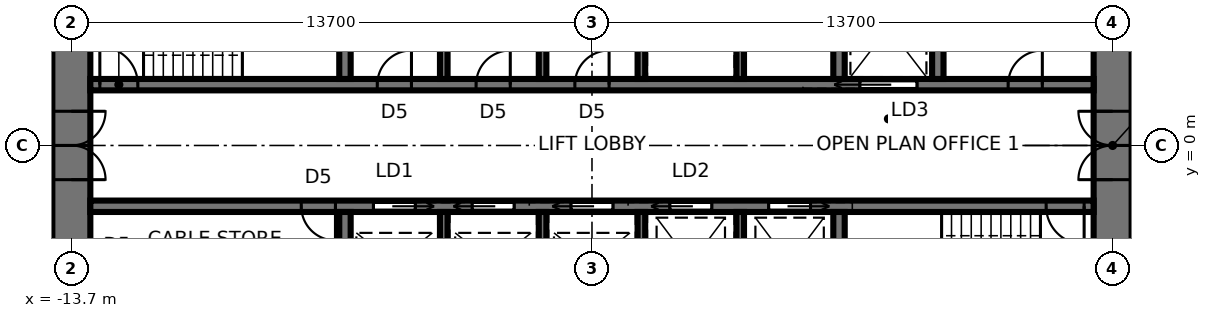
"""IFC4 building model, lengths in metres.
Left out: names, types, materials, properties, quantities, classifications, styles, units other than length and angle.
Written with IfcOpenShell. Run it as: python <this file> out.ifc"""

import sys

from ifc_helpers import new_model, si_unit, direction, frame, frame_2d, origin, place, context, subcontext, project, spatial, rectangle, extrude, element, fill, save


model = new_model("IFC4")
c1 = context("Model", 3, precision=1e-05, world=origin(), true_north=direction((0.0, 1.0)))
c2 = subcontext(c1, "Body", "Model", "MODEL_VIEW")
j1 = project(units=[si_unit("LENGTHUNIT", "METRE"), si_unit("PLANEANGLEUNIT", "RADIAN")], contexts=[c1])
p1 = place(None, origin())
s1 = spatial("IfcSite", under=j1, at=p1, CompositionType="ELEMENT")
p2 = place(p1, origin())
s2 = spatial("IfcBuilding", under=s1, at=p2, CompositionType="ELEMENT")
p3 = place(p2, frame((0.0, 0.0, 127.5)))
s3 = spatial("IfcBuildingStorey", under=s2, at=p3, CompositionType="ELEMENT", Elevation=127.5)
p4 = place(p3, frame((13.7, -9.5, 0.0), z_axis=(0.0, 0.0, 1.0), x_axis=(0.0, 1.0, 0.0)))
e1 = element("IfcWall", 1, at=p4, inside=s3, PredefinedType="SHEAR", context=c2, shape_type="SweptSolid", body=[
    extrude(rectangle(XDim=19.0, YDim=1.0, at=frame_2d((9.5, 0.0))), origin(), (0.0, 0.0, 1.0), 3.9),
])
p5 = place(p4, frame((8.6, 0.0, 0.0)))
e2 = element("IfcOpeningElement", 2, at=p5, cuts=e1, PredefinedType="OPENING", context=c2, shape_type="SweptSolid", body=[
    extrude(rectangle(XDim=1.8, YDim=2.4, at=frame_2d((0.9, 1.2))), frame((0.0, 0.51, 0.0), z_axis=(0.0, -1.0, 0.0), x_axis=(1.0, 0.0, 0.0)), (0.0, 0.0, 1.0), 1.02),
])
p6 = place(p3, frame((-13.7, 9.5, 0.0), z_axis=(0.0, 0.0, 1.0), x_axis=(0.0, -1.0, 0.0)))
e3 = element("IfcWall", 3, at=p6, inside=s3, PredefinedType="SHEAR", context=c2, shape_type="SweptSolid", body=[
    extrude(rectangle(XDim=19.0, YDim=1.0, at=frame_2d((9.5, 0.0))), origin(), (0.0, 0.0, 1.0), 3.9),
])
p7 = place(p6, frame((8.6, 0.0, 0.0)))
e4 = element("IfcOpeningElement", 4, at=p7, cuts=e3, PredefinedType="OPENING", context=c2, shape_type="SweptSolid", body=[
    extrude(rectangle(XDim=1.8, YDim=2.4, at=frame_2d((0.9, 1.2))), frame((0.0, 0.51, 0.0), z_axis=(0.0, -1.0, 0.0), x_axis=(1.0, 0.0, 0.0)), (0.0, 0.0, 1.0), 1.02),
])
p8 = place(p3, frame((-13.2, 1.6, 0.0), z_axis=(0.0, 0.0, 1.0), x_axis=(1.0, 0.0, 0.0)))
e5 = element("IfcWall", 5, at=p8, inside=s3, PredefinedType="SHEAR", context=c2, shape_type="SweptSolid", body=[
    extrude(rectangle(XDim=26.4, YDim=0.3, at=frame_2d((13.2, 0.0))), origin(), (0.0, 0.0, 1.0), 3.9),
])
p9 = place(p8, frame((0.25, 0.0, 0.0)))
e6 = element("IfcOpeningElement", 6, at=p9, cuts=e5, PredefinedType="OPENING", context=c2, shape_type="SweptSolid", body=[
    extrude(rectangle(XDim=1.0, YDim=2.1, at=frame_2d((0.5, 1.05))), frame((0.0, 0.16, 0.0), z_axis=(0.0, -1.0, 0.0), x_axis=(1.0, 0.0, 0.0)), (0.0, 0.0, 1.0), 0.32),
])
p10 = place(p8, frame((20.25, 0.0, 0.0)))
e7 = element("IfcOpeningElement", 7, at=p10, cuts=e5, PredefinedType="OPENING", context=c2, shape_type="SweptSolid", body=[
    extrude(rectangle(XDim=1.5, YDim=2.4, at=frame_2d((0.75, 1.2))), frame((0.0, 0.16, 0.0), z_axis=(0.0, -1.0, 0.0), x_axis=(1.0, 0.0, 0.0)), (0.0, 0.0, 1.0), 0.32),
])
p11 = place(p8, frame((7.55, 0.0, 0.0)))
e8 = element("IfcOpeningElement", 8, at=p11, cuts=e5, PredefinedType="OPENING", context=c2, shape_type="SweptSolid", body=[
    extrude(rectangle(XDim=0.9, YDim=2.1, at=frame_2d((0.45, 1.05))), frame((0.0, 0.16, 0.0), z_axis=(0.0, -1.0, 0.0), x_axis=(1.0, 0.0, 0.0)), (0.0, 0.0, 1.0), 0.32),
])
p12 = place(p8, frame((10.15, 0.0, 0.0)))
e9 = element("IfcOpeningElement", 9, at=p12, cuts=e5, PredefinedType="OPENING", context=c2, shape_type="SweptSolid", body=[
    extrude(rectangle(XDim=0.9, YDim=2.1, at=frame_2d((0.45, 1.05))), frame((0.0, 0.16, 0.0), z_axis=(0.0, -1.0, 0.0), x_axis=(1.0, 0.0, 0.0)), (0.0, 0.0, 1.0), 0.32),
])
p13 = place(p8, frame((12.75, 0.0, 0.0)))
e10 = element("IfcOpeningElement", 10, at=p13, cuts=e5, PredefinedType="OPENING", context=c2, shape_type="SweptSolid", body=[
    extrude(rectangle(XDim=0.9, YDim=2.1, at=frame_2d((0.45, 1.05))), frame((0.0, 0.16, 0.0), z_axis=(0.0, -1.0, 0.0), x_axis=(1.0, 0.0, 0.0)), (0.0, 0.0, 1.0), 0.32),
])
p14 = place(p8, frame((24.15, 0.0, 0.0)))
e11 = element("IfcOpeningElement", 11, at=p14, cuts=e5, PredefinedType="OPENING", context=c2, shape_type="SweptSolid", body=[
    extrude(rectangle(XDim=0.9, YDim=2.1, at=frame_2d((0.45, 1.05))), frame((0.0, 0.16, 0.0), z_axis=(0.0, -1.0, 0.0), x_axis=(1.0, 0.0, 0.0)), (0.0, 0.0, 1.0), 0.32),
])
p15 = place(p3, frame((-13.2, -1.6, 0.0), z_axis=(0.0, 0.0, 1.0), x_axis=(1.0, 0.0, 0.0)))
e12 = element("IfcWall", 12, at=p15, inside=s3, PredefinedType="SHEAR", context=c2, shape_type="SweptSolid", body=[
    extrude(rectangle(XDim=26.4, YDim=0.3, at=frame_2d((13.2, 0.0))), origin(), (0.0, 0.0, 1.0), 3.9),
])
p16 = place(p15, frame((25.15, 0.0, 0.0)))
e13 = element("IfcOpeningElement", 13, at=p16, cuts=e12, PredefinedType="OPENING", context=c2, shape_type="SweptSolid", body=[
    extrude(rectangle(XDim=1.0, YDim=2.1, at=frame_2d((0.5, 1.05))), frame((0.0, 0.16, 0.0), z_axis=(0.0, -1.0, 0.0), x_axis=(1.0, 0.0, 0.0)), (0.0, 0.0, 1.0), 0.32),
])
p17 = place(p15, frame((7.45, 0.0, 0.0)))
e14 = element("IfcOpeningElement", 14, at=p17, cuts=e12, PredefinedType="OPENING", context=c2, shape_type="SweptSolid", body=[
    extrude(rectangle(XDim=1.1, YDim=2.3, at=frame_2d((0.55, 1.15))), frame((0.0, 0.16, 0.0), z_axis=(0.0, -1.0, 0.0), x_axis=(1.0, 0.0, 0.0)), (0.0, 0.0, 1.0), 0.32),
])
p18 = place(p15, frame((10.05, 0.0, 0.0)))
e15 = element("IfcOpeningElement", 15, at=p18, cuts=e12, PredefinedType="OPENING", context=c2, shape_type="SweptSolid", body=[
    extrude(rectangle(XDim=1.1, YDim=2.3, at=frame_2d((0.55, 1.15))), frame((0.0, 0.16, 0.0), z_axis=(0.0, -1.0, 0.0), x_axis=(1.0, 0.0, 0.0)), (0.0, 0.0, 1.0), 0.32),
])
p19 = place(p15, frame((12.65, 0.0, 0.0)))
e16 = element("IfcOpeningElement", 16, at=p19, cuts=e12, PredefinedType="OPENING", context=c2, shape_type="SweptSolid", body=[
    extrude(rectangle(XDim=1.1, YDim=2.3, at=frame_2d((0.55, 1.15))), frame((0.0, 0.16, 0.0), z_axis=(0.0, -1.0, 0.0), x_axis=(1.0, 0.0, 0.0)), (0.0, 0.0, 1.0), 0.32),
])
p20 = place(p15, frame((15.25, 0.0, 0.0)))
e17 = element("IfcOpeningElement", 17, at=p20, cuts=e12, PredefinedType="OPENING", context=c2, shape_type="SweptSolid", body=[
    extrude(rectangle(XDim=1.1, YDim=2.3, at=frame_2d((0.55, 1.15))), frame((0.0, 0.16, 0.0), z_axis=(0.0, -1.0, 0.0), x_axis=(1.0, 0.0, 0.0)), (0.0, 0.0, 1.0), 0.32),
])
p21 = place(p15, frame((17.85, 0.0, 0.0)))
e18 = element("IfcOpeningElement", 18, at=p21, cuts=e12, PredefinedType="OPENING", context=c2, shape_type="SweptSolid", body=[
    extrude(rectangle(XDim=1.1, YDim=2.3, at=frame_2d((0.55, 1.15))), frame((0.0, 0.16, 0.0), z_axis=(0.0, -1.0, 0.0), x_axis=(1.0, 0.0, 0.0)), (0.0, 0.0, 1.0), 0.32),
])
p22 = place(p15, frame((5.55, 0.0, 0.0)))
e19 = element("IfcOpeningElement", 19, at=p22, cuts=e12, PredefinedType="OPENING", context=c2, shape_type="SweptSolid", body=[
    extrude(rectangle(XDim=0.9, YDim=2.1, at=frame_2d((0.45, 1.05))), frame((0.0, 0.16, 0.0), z_axis=(0.0, -1.0, 0.0), x_axis=(1.0, 0.0, 0.0)), (0.0, 0.0, 1.0), 0.32),
])
for number, where, z_axis, x_axis in (
    (20, (-6.5, 1.75, 0.0), (0.0, 0.0, 1.0), (0.0, 1.0, 0.0)),
    (21, (6.5, 1.75, 0.0), (0.0, 0.0, 1.0), (0.0, 1.0, 0.0)),
):
    element("IfcWall", number, at=place(p3, frame(where, z_axis=z_axis, x_axis=x_axis)), inside=s3, PredefinedType="SHEAR", context=c2, shape_type="SweptSolid", body=[
        extrude(rectangle(XDim=2.7, YDim=0.3, at=frame_2d((1.35, 0.0))), origin(), (0.0, 0.0, 1.0), 3.9),
    ])
for number, where, z_axis, x_axis in (
    (22, (-3.9, 1.75, 0.0), (0.0, 0.0, 1.0), (0.0, 1.0, 0.0)),
    (23, (-1.3, 1.75, 0.0), (0.0, 0.0, 1.0), (0.0, 1.0, 0.0)),
    (24, (1.3, 1.75, 0.0), (0.0, 0.0, 1.0), (0.0, 1.0, 0.0)),
    (25, (3.9, 1.75, 0.0), (0.0, 0.0, 1.0), (0.0, 1.0, 0.0)),
):
    element("IfcWall", number, at=place(p3, frame(where, z_axis=z_axis, x_axis=x_axis)), inside=s3, PredefinedType="SHEAR", context=c2, shape_type="SweptSolid", body=[
        extrude(rectangle(XDim=2.7, YDim=0.2, at=frame_2d((1.35, 0.0))), origin(), (0.0, 0.0, 1.0), 3.9),
    ])
for number, where, z_axis, x_axis in (
    (26, (-6.5, -1.75, 0.0), (0.0, 0.0, 1.0), (0.0, -1.0, 0.0)),
    (27, (6.5, -1.75, 0.0), (0.0, 0.0, 1.0), (0.0, -1.0, 0.0)),
):
    element("IfcWall", number, at=place(p3, frame(where, z_axis=z_axis, x_axis=x_axis)), inside=s3, PredefinedType="SHEAR", context=c2, shape_type="SweptSolid", body=[
        extrude(rectangle(XDim=2.7, YDim=0.3, at=frame_2d((1.35, 0.0))), origin(), (0.0, 0.0, 1.0), 3.9),
    ])
for number, where, z_axis, x_axis in (
    (28, (-3.9, -1.75, 0.0), (0.0, 0.0, 1.0), (0.0, -1.0, 0.0)),
    (29, (-1.3, -1.75, 0.0), (0.0, 0.0, 1.0), (0.0, -1.0, 0.0)),
    (30, (1.3, -1.75, 0.0), (0.0, 0.0, 1.0), (0.0, -1.0, 0.0)),
    (31, (3.9, -1.75, 0.0), (0.0, 0.0, 1.0), (0.0, -1.0, 0.0)),
):
    element("IfcWall", number, at=place(p3, frame(where, z_axis=z_axis, x_axis=x_axis)), inside=s3, PredefinedType="SHEAR", context=c2, shape_type="SweptSolid", body=[
        extrude(rectangle(XDim=2.7, YDim=0.2, at=frame_2d((1.35, 0.0))), origin(), (0.0, 0.0, 1.0), 3.9),
    ])
p23 = place(p3, frame((9.1, 1.75, 0.0), z_axis=(0.0, 0.0, 1.0), x_axis=(0.0, 1.0, 0.0)))
e32 = element("IfcWall", 32, at=p23, inside=s3, PredefinedType="SHEAR", context=c2, shape_type="SweptSolid", body=[
    extrude(rectangle(XDim=2.7, YDim=0.3, at=frame_2d((1.35, 0.0))), origin(), (0.0, 0.0, 1.0), 3.9),
])
p24 = place(p7, origin())
e33 = element("IfcDoor", 33, at=p24, inside=s3, OperationType="DOUBLE_DOOR_SINGLE_SWING", PredefinedType="DOOR", context=c2, shape_type="SweptSolid", body=[
    extrude(rectangle(XDim=1.72, YDim=2.36, at=frame_2d((0.9, 1.18))), frame((0.0, 0.025, 0.0), z_axis=(0.0, -1.0, 0.0), x_axis=(1.0, 0.0, 0.0)), (0.0, 0.0, 1.0), 0.05),
    extrude(rectangle(XDim=0.04, YDim=2.4, at=frame_2d((0.02, 1.2))), frame((0.0, 0.25, 0.0), z_axis=(0.0, -1.0, 0.0), x_axis=(1.0, 0.0, 0.0)), (0.0, 0.0, 1.0), 0.5),
    extrude(rectangle(XDim=0.04, YDim=2.4, at=frame_2d((1.78, 1.2))), frame((0.0, 0.25, 0.0), z_axis=(0.0, -1.0, 0.0), x_axis=(1.0, 0.0, 0.0)), (0.0, 0.0, 1.0), 0.5),
    extrude(rectangle(XDim=1.72, YDim=0.04, at=frame_2d((0.9, 2.38))), frame((0.0, 0.25, 0.0), z_axis=(0.0, -1.0, 0.0), x_axis=(1.0, 0.0, 0.0)), (0.0, 0.0, 1.0), 0.5),
])
fill(e4, e33)
p25 = place(p5, origin())
e34 = element("IfcDoor", 34, at=p25, inside=s3, OperationType="DOUBLE_DOOR_SINGLE_SWING", PredefinedType="DOOR", context=c2, shape_type="SweptSolid", body=[
    extrude(rectangle(XDim=1.72, YDim=2.36, at=frame_2d((0.9, 1.18))), frame((0.0, 0.025, 0.0), z_axis=(0.0, -1.0, 0.0), x_axis=(1.0, 0.0, 0.0)), (0.0, 0.0, 1.0), 0.05),
    extrude(rectangle(XDim=0.04, YDim=2.4, at=frame_2d((0.02, 1.2))), frame((0.0, 0.25, 0.0), z_axis=(0.0, -1.0, 0.0), x_axis=(1.0, 0.0, 0.0)), (0.0, 0.0, 1.0), 0.5),
    extrude(rectangle(XDim=0.04, YDim=2.4, at=frame_2d((1.78, 1.2))), frame((0.0, 0.25, 0.0), z_axis=(0.0, -1.0, 0.0), x_axis=(1.0, 0.0, 0.0)), (0.0, 0.0, 1.0), 0.5),
    extrude(rectangle(XDim=1.72, YDim=0.04, at=frame_2d((0.9, 2.38))), frame((0.0, 0.25, 0.0), z_axis=(0.0, -1.0, 0.0), x_axis=(1.0, 0.0, 0.0)), (0.0, 0.0, 1.0), 0.5),
])
fill(e2, e34)
p26 = place(p9, origin())
e35 = element("IfcDoor", 35, at=p26, inside=s3, OperationType="SINGLE_SWING_LEFT", PredefinedType="DOOR", context=c2, shape_type="SweptSolid", body=[
    extrude(rectangle(XDim=1.0, YDim=2.1, at=frame_2d((0.5, 1.05))), frame((0.0, 0.025, 0.0), z_axis=(0.0, -1.0, 0.0), x_axis=(1.0, 0.0, 0.0)), (0.0, 0.0, 1.0), 0.05),
])
fill(e6, e35)
p27 = place(p16, frame((1.0, 0.0, 0.0), z_axis=(0.0, 0.0, 1.0), x_axis=(-1.0, 0.0, 0.0)))
e36 = element("IfcDoor", 36, at=p27, inside=s3, OperationType="SINGLE_SWING_LEFT", PredefinedType="DOOR", context=c2, shape_type="SweptSolid", body=[
    extrude(rectangle(XDim=1.0, YDim=2.1, at=frame_2d((0.5, 1.05))), frame((0.0, 0.025, 0.0), z_axis=(0.0, -1.0, 0.0), x_axis=(1.0, 0.0, 0.0)), (0.0, 0.0, 1.0), 0.05),
])
fill(e13, e36)
p28 = place(p10, origin())
e37 = element("IfcDoor", 37, at=p28, inside=s3, OperationType="SLIDING_TO_LEFT", PredefinedType="DOOR", context=c2, shape_type="SweptSolid", body=[
    extrude(rectangle(XDim=1.5, YDim=2.4, at=frame_2d((0.75, 1.2))), frame((0.0, 0.025, 0.0), z_axis=(0.0, -1.0, 0.0), x_axis=(1.0, 0.0, 0.0)), (0.0, 0.0, 1.0), 0.05),
])
fill(e7, e37)
p29 = place(p11, origin())
e38 = element("IfcDoor", 38, at=p29, inside=s3, OperationType="SINGLE_SWING_RIGHT", PredefinedType="DOOR", context=c2, shape_type="SweptSolid", body=[
    extrude(rectangle(XDim=0.9, YDim=2.1, at=frame_2d((0.45, 1.05))), frame((0.0, 0.025, 0.0), z_axis=(0.0, -1.0, 0.0), x_axis=(1.0, 0.0, 0.0)), (0.0, 0.0, 1.0), 0.05),
])
fill(e8, e38)
p30 = place(p12, origin())
e39 = element("IfcDoor", 39, at=p30, inside=s3, OperationType="SINGLE_SWING_RIGHT", PredefinedType="DOOR", context=c2, shape_type="SweptSolid", body=[
    extrude(rectangle(XDim=0.9, YDim=2.1, at=frame_2d((0.45, 1.05))), frame((0.0, 0.025, 0.0), z_axis=(0.0, -1.0, 0.0), x_axis=(1.0, 0.0, 0.0)), (0.0, 0.0, 1.0), 0.05),
])
fill(e9, e39)
p31 = place(p13, origin())
e40 = element("IfcDoor", 40, at=p31, inside=s3, OperationType="SINGLE_SWING_RIGHT", PredefinedType="DOOR", context=c2, shape_type="SweptSolid", body=[
    extrude(rectangle(XDim=0.9, YDim=2.1, at=frame_2d((0.45, 1.05))), frame((0.0, 0.025, 0.0), z_axis=(0.0, -1.0, 0.0), x_axis=(1.0, 0.0, 0.0)), (0.0, 0.0, 1.0), 0.05),
])
fill(e10, e40)
p32 = place(p17, frame((1.1, 0.0, 0.0), z_axis=(0.0, 0.0, 1.0), x_axis=(-1.0, 0.0, 0.0)))
e41 = element("IfcDoor", 41, at=p32, inside=s3, OperationType="SLIDING_TO_LEFT", PredefinedType="DOOR", context=c2, shape_type="SweptSolid", body=[
    extrude(rectangle(XDim=1.1, YDim=2.3, at=frame_2d((0.55, 1.15))), frame((0.0, 0.025, 0.0), z_axis=(0.0, -1.0, 0.0), x_axis=(1.0, 0.0, 0.0)), (0.0, 0.0, 1.0), 0.05),
])
fill(e14, e41)
p33 = place(p18, frame((1.1, 0.0, 0.0), z_axis=(0.0, 0.0, 1.0), x_axis=(-1.0, 0.0, 0.0)))
e42 = element("IfcDoor", 42, at=p33, inside=s3, OperationType="SLIDING_TO_RIGHT", PredefinedType="DOOR", context=c2, shape_type="SweptSolid", body=[
    extrude(rectangle(XDim=1.1, YDim=2.3, at=frame_2d((0.55, 1.15))), frame((0.0, 0.025, 0.0), z_axis=(0.0, -1.0, 0.0), x_axis=(1.0, 0.0, 0.0)), (0.0, 0.0, 1.0), 0.05),
])
fill(e15, e42)
p34 = place(p19, frame((1.1, 0.0, 0.0), z_axis=(0.0, 0.0, 1.0), x_axis=(-1.0, 0.0, 0.0)))
e43 = element("IfcDoor", 43, at=p34, inside=s3, OperationType="SLIDING_TO_RIGHT", PredefinedType="DOOR", context=c2, shape_type="SweptSolid", body=[
    extrude(rectangle(XDim=1.1, YDim=2.3, at=frame_2d((0.55, 1.15))), frame((0.0, 0.025, 0.0), z_axis=(0.0, -1.0, 0.0), x_axis=(1.0, 0.0, 0.0)), (0.0, 0.0, 1.0), 0.05),
])
fill(e16, e43)
p35 = place(p20, frame((1.1, 0.0, 0.0), z_axis=(0.0, 0.0, 1.0), x_axis=(-1.0, 0.0, 0.0)))
e44 = element("IfcDoor", 44, at=p35, inside=s3, OperationType="SLIDING_TO_RIGHT", PredefinedType="DOOR", context=c2, shape_type="SweptSolid", body=[
    extrude(rectangle(XDim=1.1, YDim=2.3, at=frame_2d((0.55, 1.15))), frame((0.0, 0.025, 0.0), z_axis=(0.0, -1.0, 0.0), x_axis=(1.0, 0.0, 0.0)), (0.0, 0.0, 1.0), 0.05),
])
fill(e17, e44)
p36 = place(p21, frame((1.1, 0.0, 0.0), z_axis=(0.0, 0.0, 1.0), x_axis=(-1.0, 0.0, 0.0)))
e45 = element("IfcDoor", 45, at=p36, inside=s3, OperationType="SLIDING_TO_LEFT", PredefinedType="DOOR", context=c2, shape_type="SweptSolid", body=[
    extrude(rectangle(XDim=1.1, YDim=2.3, at=frame_2d((0.55, 1.15))), frame((0.0, 0.025, 0.0), z_axis=(0.0, -1.0, 0.0), x_axis=(1.0, 0.0, 0.0)), (0.0, 0.0, 1.0), 0.05),
])
fill(e18, e45)
p37 = place(p14, origin())
e46 = element("IfcDoor", 46, at=p37, inside=s3, OperationType="SINGLE_SWING_RIGHT", PredefinedType="DOOR", context=c2, shape_type="SweptSolid", body=[
    extrude(rectangle(XDim=0.9, YDim=2.1, at=frame_2d((0.45, 1.05))), frame((0.0, 0.025, 0.0), z_axis=(0.0, -1.0, 0.0), x_axis=(1.0, 0.0, 0.0)), (0.0, 0.0, 1.0), 0.05),
])
fill(e11, e46)
p38 = place(p22, frame((0.9, 0.0, 0.0), z_axis=(0.0, 0.0, 1.0), x_axis=(-1.0, 0.0, 0.0)))
e47 = element("IfcDoor", 47, at=p38, inside=s3, OperationType="SINGLE_SWING_LEFT", PredefinedType="DOOR", context=c2, shape_type="SweptSolid", body=[
    extrude(rectangle(XDim=0.9, YDim=2.1, at=frame_2d((0.45, 1.05))), frame((0.0, 0.025, 0.0), z_axis=(0.0, -1.0, 0.0), x_axis=(1.0, 0.0, 0.0)), (0.0, 0.0, 1.0), 0.05),
])
fill(e19, e47)
save(model, sys.argv[1])
